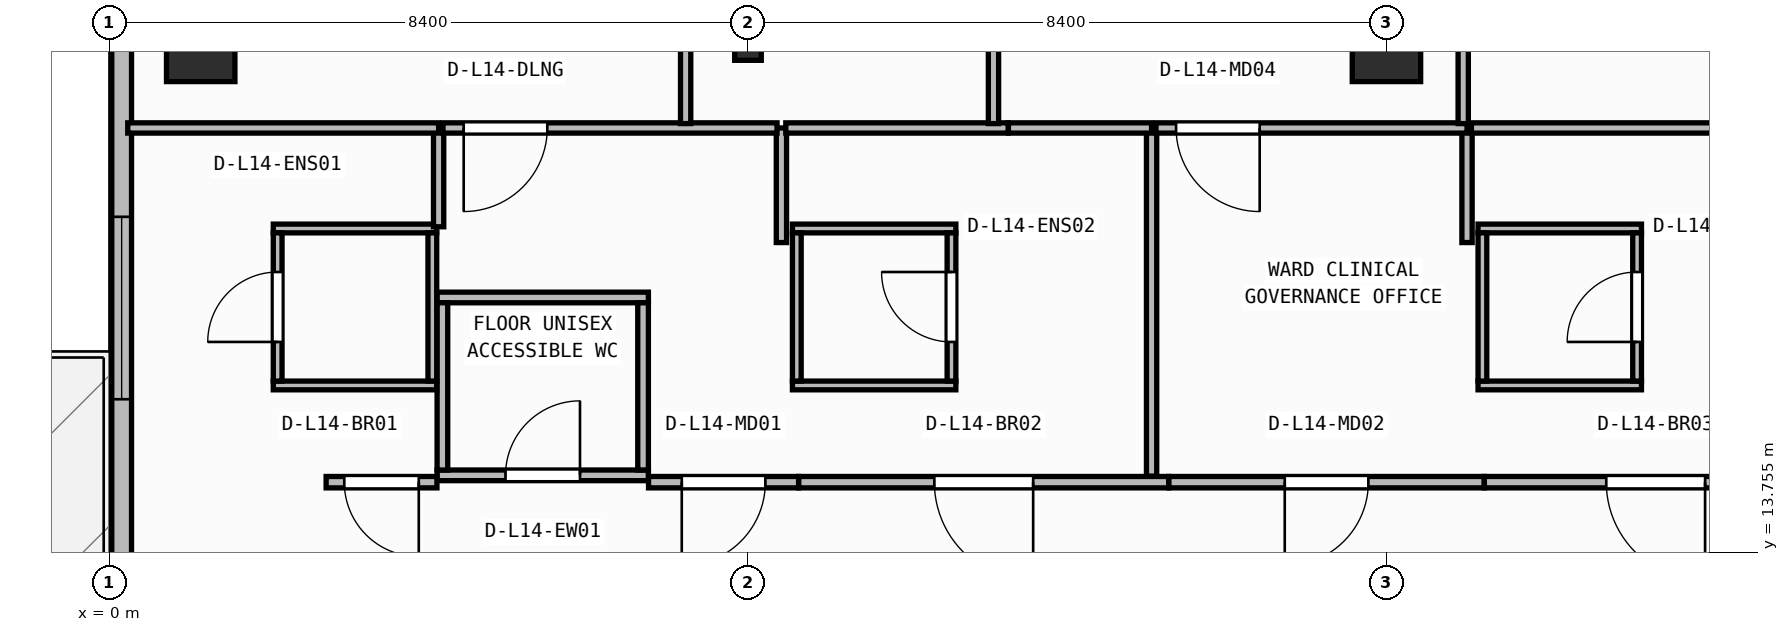
"""IFC4 building model, lengths in metres.
Left out: names, types, materials, properties, quantities, classifications, styles, units other than length and angle.
Written with IfcOpenShell. Run it as: python <this file> out.ifc"""

import sys

from ifc_helpers import new_model, si_unit, direction, frame, frame_2d, origin, origin_2d, place, context, subcontext, project, spatial, rectangle, i_section, extrude, element, fill, save


model = new_model("IFC4")
c1 = context("Model", 3, precision=1e-05, world=origin(), true_north=direction((0.0, 1.0)))
c2 = subcontext(c1, "Body", "Model", "MODEL_VIEW")
j1 = project(units=[si_unit("LENGTHUNIT", "METRE"), si_unit("PLANEANGLEUNIT", "RADIAN")], contexts=[c1])
p1 = place(None, origin())
s1 = spatial("IfcSite", under=j1, at=p1, CompositionType="ELEMENT")
p2 = place(p1, origin())
s2 = spatial("IfcBuilding", under=s1, at=p2, CompositionType="ELEMENT")
p3 = place(p2, frame((0.0, 0.0, 58.05)))
s3 = spatial("IfcBuildingStorey", under=s2, at=p3, CompositionType="ELEMENT", Elevation=58.05)
p4 = place(p3, frame((1.2, 20.4, 0.0), z_axis=(0.0, 0.0, 1.0), x_axis=(1.0, 0.0, 0.0)))
e1 = element("IfcColumn", 1, at=p4, inside=s3, PredefinedType="COLUMN", context=c2, shape_type="SweptSolid", body=[
    extrude(rectangle(XDim=0.9, YDim=0.9, at=origin_2d()), origin(), (0.0, 0.0, 1.0), 3.95),
])
p5 = place(p3, frame((8.4, 20.4, 0.0), z_axis=(0.0, 0.0, 1.0), x_axis=(1.0, 0.0, 0.0)))
e2 = element("IfcColumn", 2, at=p5, inside=s3, PredefinedType="COLUMN", context=c2, shape_type="SweptSolid", body=[
    extrude(i_section(OverallWidth=0.35, OverallDepth=0.34, WebThickness=0.016, FlangeThickness=0.028, at=origin_2d()), origin(), (0.0, 0.0, 1.0), 3.95),
])
p6 = place(p3, frame((16.8, 20.4, 0.0), z_axis=(0.0, 0.0, 1.0), x_axis=(1.0, 0.0, 0.0)))
e3 = element("IfcColumn", 3, at=p6, inside=s3, PredefinedType="COLUMN", context=c2, shape_type="SweptSolid", body=[
    extrude(rectangle(XDim=0.9, YDim=0.9, at=origin_2d()), origin(), (0.0, 0.0, 1.0), 3.95),
])
p7 = place(p3, frame((0.16, 41.04, 0.0), z_axis=(0.0, 0.0, 1.0), x_axis=(0.0, -1.0, 0.0)))
e4 = element("IfcWall", 4, at=p7, inside=s3, PredefinedType="STANDARD", context=c2, shape_type="SweptSolid", body=[
    extrude(rectangle(XDim=38.28, YDim=0.26, at=frame_2d((19.14, 0.0))), origin(), (0.0, 0.0, 1.0), 3.71),
])
p8 = place(p7, frame((30.187, 0.0, 0.0)))
e5 = element("IfcOpeningElement", 5, at=p8, cuts=e4, PredefinedType="OPENING", context=c2, shape_type="SweptSolid", body=[
    extrude(rectangle(XDim=1.3, YDim=2.15, at=frame_2d((0.65, 1.075))), frame((0.0, 0.14, 0.0), z_axis=(0.0, -1.0, 0.0), x_axis=(1.0, 0.0, 0.0)), (0.0, 0.0, 1.0), 0.28),
])
p9 = place(p7, frame((22.869, 0.0, 0.9)))
e6 = element("IfcOpeningElement", 6, at=p9, cuts=e4, PredefinedType="OPENING", context=c2, shape_type="SweptSolid", body=[
    extrude(rectangle(XDim=2.4, YDim=1.65, at=frame_2d((1.2, 0.825))), frame((0.0, 0.14, 0.0), z_axis=(0.0, -1.0, 0.0), x_axis=(1.0, 0.0, 0.0)), (0.0, 0.0, 1.0), 0.28),
])
p10 = place(p3, frame((4.31, 14.77, 0.0), z_axis=(0.0, 0.0, 1.0), x_axis=(1.0, 0.0, 0.0)))
e7 = element("IfcWall", 7, at=p10, inside=s3, PredefinedType="PARTITIONING", context=c2, shape_type="SweptSolid", body=[
    extrude(rectangle(XDim=2.78, YDim=0.14, at=frame_2d((1.39, 0.0))), origin(), (0.0, 0.0, 1.0), 3.71),
])
p11 = place(p10, frame((0.9, 0.0, 0.0)))
e8 = element("IfcOpeningElement", 8, at=p11, cuts=e7, PredefinedType="OPENING", context=c2, shape_type="SweptSolid", body=[
    extrude(rectangle(XDim=0.98, YDim=2.1, at=frame_2d((0.49, 1.05))), frame((0.0, 0.08, 0.0), z_axis=(0.0, -1.0, 0.0), x_axis=(1.0, 0.0, 0.0)), (0.0, 0.0, 1.0), 0.16),
])
p12 = place(p3, frame((4.31, 17.11, 0.0), z_axis=(0.0, 0.0, 1.0), x_axis=(1.0, 0.0, 0.0)))
e9 = element("IfcWall", 9, at=p12, inside=s3, PredefinedType="PARTITIONING", context=c2, shape_type="SweptSolid", body=[
    extrude(rectangle(XDim=2.78, YDim=0.14, at=frame_2d((1.39, 0.0))), origin(), (0.0, 0.0, 1.0), 3.71),
])
for number, where, z_axis, x_axis in (
    (10, (4.38, 14.84, 0.0), (0.0, 0.0, 1.0), (0.0, 1.0, 0.0)),
    (11, (7.02, 14.84, 0.0), (0.0, 0.0, 1.0), (0.0, 1.0, 0.0)),
):
    element("IfcWall", number, at=place(p3, frame(where, z_axis=z_axis, x_axis=x_axis)), inside=s3, PredefinedType="PARTITIONING", context=c2, shape_type="SweptSolid", body=[
        extrude(rectangle(XDim=2.2, YDim=0.14, at=frame_2d((1.1, 0.0))), origin(), (0.0, 0.0, 1.0), 3.71),
    ])
for number, where, z_axis, x_axis in (
    (12, (2.155, 15.952, 0.0), (0.0, 0.0, 1.0), (1.0, 0.0, 0.0)),
    (13, (2.155, 18.018, 0.0), (0.0, 0.0, 1.0), (1.0, 0.0, 0.0)),
):
    element("IfcWall", number, at=place(p3, frame(where, z_axis=z_axis, x_axis=x_axis)), inside=s3, PredefinedType="PARTITIONING", context=c2, shape_type="SweptSolid", body=[
        extrude(rectangle(XDim=2.15, YDim=0.115, at=frame_2d((1.075, 0.0))), origin(), (0.0, 0.0, 1.0), 3.71),
    ])
p13 = place(p3, frame((2.212, 16.01, 0.0), z_axis=(0.0, 0.0, 1.0), x_axis=(0.0, 1.0, 0.0)))
e14 = element("IfcWall", 14, at=p13, inside=s3, PredefinedType="PARTITIONING", context=c2, shape_type="SweptSolid", body=[
    extrude(rectangle(XDim=1.95, YDim=0.115, at=frame_2d((0.975, 0.0))), origin(), (0.0, 0.0, 1.0), 3.71),
])
p14 = place(p13, frame((0.515, 0.0, 0.0)))
e15 = element("IfcOpeningElement", 15, at=p14, cuts=e14, PredefinedType="OPENING", context=c2, shape_type="SweptSolid", body=[
    extrude(rectangle(XDim=0.92, YDim=2.1, at=frame_2d((0.46, 1.05))), frame((0.0, 0.067, 0.0), z_axis=(0.0, -1.0, 0.0), x_axis=(1.0, 0.0, 0.0)), (0.0, 0.0, 1.0), 0.135),
])
p15 = place(p3, frame((4.248, 16.01, 0.0), z_axis=(0.0, 0.0, 1.0), x_axis=(0.0, 1.0, 0.0)))
e16 = element("IfcWall", 16, at=p15, inside=s3, PredefinedType="PARTITIONING", context=c2, shape_type="SweptSolid", body=[
    extrude(rectangle(XDim=1.95, YDim=0.115, at=frame_2d((0.975, 0.0))), origin(), (0.0, 0.0, 1.0), 3.71),
])
for number, where, z_axis, x_axis in (
    (17, (8.985, 15.952, 0.0), (0.0, 0.0, 1.0), (1.0, 0.0, 0.0)),
    (18, (8.985, 18.018, 0.0), (0.0, 0.0, 1.0), (1.0, 0.0, 0.0)),
):
    element("IfcWall", number, at=place(p3, frame(where, z_axis=z_axis, x_axis=x_axis)), inside=s3, PredefinedType="PARTITIONING", context=c2, shape_type="SweptSolid", body=[
        extrude(rectangle(XDim=2.15, YDim=0.115, at=frame_2d((1.075, 0.0))), origin(), (0.0, 0.0, 1.0), 3.71),
    ])
p16 = place(p3, frame((9.042, 16.01, 0.0), z_axis=(0.0, 0.0, 1.0), x_axis=(0.0, 1.0, 0.0)))
e19 = element("IfcWall", 19, at=p16, inside=s3, PredefinedType="PARTITIONING", context=c2, shape_type="SweptSolid", body=[
    extrude(rectangle(XDim=1.95, YDim=0.115, at=frame_2d((0.975, 0.0))), origin(), (0.0, 0.0, 1.0), 3.71),
])
p17 = place(p3, frame((11.077, 16.01, 0.0), z_axis=(0.0, 0.0, 1.0), x_axis=(0.0, 1.0, 0.0)))
e20 = element("IfcWall", 20, at=p17, inside=s3, PredefinedType="PARTITIONING", context=c2, shape_type="SweptSolid", body=[
    extrude(rectangle(XDim=1.95, YDim=0.115, at=frame_2d((0.975, 0.0))), origin(), (0.0, 0.0, 1.0), 3.71),
])
p18 = place(p17, frame((0.515, 0.0, 0.0)))
e21 = element("IfcOpeningElement", 21, at=p18, cuts=e20, PredefinedType="OPENING", context=c2, shape_type="SweptSolid", body=[
    extrude(rectangle(XDim=0.92, YDim=2.1, at=frame_2d((0.46, 1.05))), frame((0.0, 0.067, 0.0), z_axis=(0.0, -1.0, 0.0), x_axis=(1.0, 0.0, 0.0)), (0.0, 0.0, 1.0), 0.135),
])
for number, where, z_axis, x_axis in (
    (22, (18.005, 15.952, 0.0), (0.0, 0.0, 1.0), (1.0, 0.0, 0.0)),
    (23, (18.005, 18.018, 0.0), (0.0, 0.0, 1.0), (1.0, 0.0, 0.0)),
):
    element("IfcWall", number, at=place(p3, frame(where, z_axis=z_axis, x_axis=x_axis)), inside=s3, PredefinedType="PARTITIONING", context=c2, shape_type="SweptSolid", body=[
        extrude(rectangle(XDim=2.15, YDim=0.115, at=frame_2d((1.075, 0.0))), origin(), (0.0, 0.0, 1.0), 3.71),
    ])
p19 = place(p3, frame((18.062, 16.01, 0.0), z_axis=(0.0, 0.0, 1.0), x_axis=(0.0, 1.0, 0.0)))
e24 = element("IfcWall", 24, at=p19, inside=s3, PredefinedType="PARTITIONING", context=c2, shape_type="SweptSolid", body=[
    extrude(rectangle(XDim=1.95, YDim=0.115, at=frame_2d((0.975, 0.0))), origin(), (0.0, 0.0, 1.0), 3.71),
])
p20 = place(p3, frame((20.097, 16.01, 0.0), z_axis=(0.0, 0.0, 1.0), x_axis=(0.0, 1.0, 0.0)))
e25 = element("IfcWall", 25, at=p20, inside=s3, PredefinedType="PARTITIONING", context=c2, shape_type="SweptSolid", body=[
    extrude(rectangle(XDim=1.95, YDim=0.115, at=frame_2d((0.975, 0.0))), origin(), (0.0, 0.0, 1.0), 3.71),
])
p21 = place(p20, frame((0.515, 0.0, 0.0)))
e26 = element("IfcOpeningElement", 26, at=p21, cuts=e25, PredefinedType="OPENING", context=c2, shape_type="SweptSolid", body=[
    extrude(rectangle(XDim=0.92, YDim=2.1, at=frame_2d((0.46, 1.05))), frame((0.0, 0.067, 0.0), z_axis=(0.0, -1.0, 0.0), x_axis=(1.0, 0.0, 0.0)), (0.0, 0.0, 1.0), 0.135),
])
p22 = place(p3, frame((4.308, 14.68, 0.0), z_axis=(0.0, 0.0, 1.0), x_axis=(-1.0, 0.0, 0.0)))
e27 = element("IfcWall", 27, at=p22, inside=s3, PredefinedType="PARTITIONING", context=c2, shape_type="SweptSolid", body=[
    extrude(rectangle(XDim=1.458, YDim=0.15, at=frame_2d((0.729, 0.0))), origin(), (0.0, 0.0, 1.0), 3.71),
])
p23 = place(p22, frame((0.239, 0.0, 0.0)))
e28 = element("IfcOpeningElement", 28, at=p23, cuts=e27, PredefinedType="OPENING", context=c2, shape_type="SweptSolid", body=[
    extrude(rectangle(XDim=0.98, YDim=2.1, at=frame_2d((0.49, 1.05))), frame((0.0, 0.085, 0.0), z_axis=(0.0, -1.0, 0.0), x_axis=(1.0, 0.0, 0.0)), (0.0, 0.0, 1.0), 0.17),
])
p24 = place(p3, frame((9.066, 14.68, 0.0), z_axis=(0.0, 0.0, 1.0), x_axis=(-1.0, 0.0, 0.0)))
e29 = element("IfcWall", 29, at=p24, inside=s3, PredefinedType="PARTITIONING", context=c2, shape_type="SweptSolid", body=[
    extrude(rectangle(XDim=1.974, YDim=0.15, at=frame_2d((0.987, 0.0))), origin(), (0.0, 0.0, 1.0), 3.71),
])
p25 = place(p24, frame((0.437, 0.0, 0.0)))
e30 = element("IfcOpeningElement", 30, at=p25, cuts=e29, PredefinedType="OPENING", context=c2, shape_type="SweptSolid", body=[
    extrude(rectangle(XDim=1.1, YDim=2.1, at=frame_2d((0.55, 1.05))), frame((0.0, 0.085, 0.0), z_axis=(0.0, -1.0, 0.0), x_axis=(1.0, 0.0, 0.0)), (0.0, 0.0, 1.0), 0.17),
])
p26 = place(p3, frame((13.936, 14.68, 0.0), z_axis=(0.0, 0.0, 1.0), x_axis=(-1.0, 0.0, 0.0)))
e31 = element("IfcWall", 31, at=p26, inside=s3, PredefinedType="PARTITIONING", context=c2, shape_type="SweptSolid", body=[
    extrude(rectangle(XDim=4.868, YDim=0.15, at=frame_2d((2.434, 0.0))), origin(), (0.0, 0.0, 1.0), 3.71),
])
p27 = place(p26, frame((1.784, 0.0, 0.0)))
e32 = element("IfcOpeningElement", 32, at=p27, cuts=e31, PredefinedType="OPENING", context=c2, shape_type="SweptSolid", body=[
    extrude(rectangle(XDim=1.3, YDim=2.15, at=frame_2d((0.65, 1.075))), frame((0.0, 0.085, 0.0), z_axis=(0.0, -1.0, 0.0), x_axis=(1.0, 0.0, 0.0)), (0.0, 0.0, 1.0), 0.17),
])
p28 = place(p3, frame((18.086, 14.68, 0.0), z_axis=(0.0, 0.0, 1.0), x_axis=(-1.0, 0.0, 0.0)))
e33 = element("IfcWall", 33, at=p28, inside=s3, PredefinedType="PARTITIONING", context=c2, shape_type="SweptSolid", body=[
    extrude(rectangle(XDim=4.148, YDim=0.15, at=frame_2d((2.074, 0.0))), origin(), (0.0, 0.0, 1.0), 3.71),
])
p29 = place(p28, frame((1.524, 0.0, 0.0)))
e34 = element("IfcOpeningElement", 34, at=p29, cuts=e33, PredefinedType="OPENING", context=c2, shape_type="SweptSolid", body=[
    extrude(rectangle(XDim=1.1, YDim=2.1, at=frame_2d((0.55, 1.05))), frame((0.0, 0.085, 0.0), z_axis=(0.0, -1.0, 0.0), x_axis=(1.0, 0.0, 0.0)), (0.0, 0.0, 1.0), 0.17),
])
p30 = place(p3, frame((22.596, 14.68, 0.0), z_axis=(0.0, 0.0, 1.0), x_axis=(-1.0, 0.0, 0.0)))
e35 = element("IfcWall", 35, at=p30, inside=s3, PredefinedType="PARTITIONING", context=c2, shape_type="SweptSolid", body=[
    extrude(rectangle(XDim=4.508, YDim=0.15, at=frame_2d((2.254, 0.0))), origin(), (0.0, 0.0, 1.0), 3.71),
])
p31 = place(p30, frame((1.604, 0.0, 0.0)))
e36 = element("IfcOpeningElement", 36, at=p31, cuts=e35, PredefinedType="OPENING", context=c2, shape_type="SweptSolid", body=[
    extrude(rectangle(XDim=1.3, YDim=2.15, at=frame_2d((0.65, 1.075))), frame((0.0, 0.085, 0.0), z_axis=(0.0, -1.0, 0.0), x_axis=(1.0, 0.0, 0.0)), (0.0, 0.0, 1.0), 0.17),
])
p32 = place(p3, frame((4.33, 18.04, 0.0), z_axis=(0.0, 0.0, 1.0), x_axis=(0.0, 1.0, 0.0)))
e37 = element("IfcWall", 37, at=p32, inside=s3, PredefinedType="PARTITIONING", context=c2, shape_type="SweptSolid", body=[
    extrude(rectangle(XDim=1.3, YDim=0.135, at=frame_2d((0.65, 0.0))), origin(), (0.0, 0.0, 1.0), 3.71),
])
p33 = place(p3, frame((4.33, 19.34, 0.0), z_axis=(0.0, 0.0, 1.0), x_axis=(-1.0, 0.0, 0.0)))
e38 = element("IfcWall", 38, at=p33, inside=s3, PredefinedType="PARTITIONING", context=c2, shape_type="SweptSolid", body=[
    extrude(rectangle(XDim=4.09, YDim=0.135, at=frame_2d((2.045, 0.0))), origin(), (0.0, 0.0, 1.0), 3.71),
])
p34 = place(p3, frame((8.84, 17.833, 0.0), z_axis=(0.0, 0.0, 1.0), x_axis=(0.0, 1.0, 0.0)))
e39 = element("IfcWall", 39, at=p34, inside=s3, PredefinedType="PARTITIONING", context=c2, shape_type="SweptSolid", body=[
    extrude(rectangle(XDim=1.508, YDim=0.135, at=frame_2d((0.754, 0.0))), origin(), (0.0, 0.0, 1.0), 3.71),
])
p35 = place(p3, frame((8.782, 19.34, 0.0), z_axis=(0.0, 0.0, 1.0), x_axis=(-1.0, 0.0, 0.0)))
e40 = element("IfcWall", 40, at=p35, inside=s3, PredefinedType="PARTITIONING", context=c2, shape_type="SweptSolid", body=[
    extrude(rectangle(XDim=4.395, YDim=0.135, at=frame_2d((2.198, 0.0))), origin(), (0.0, 0.0, 1.0), 3.71),
])
p36 = place(p35, frame((3.023, 0.0, 0.0)))
e41 = element("IfcOpeningElement", 41, at=p36, cuts=e40, PredefinedType="OPENING", context=c2, shape_type="SweptSolid", body=[
    extrude(rectangle(XDim=1.1, YDim=2.1, at=frame_2d((0.55, 1.05))), frame((0.0, 0.077, 0.0), z_axis=(0.0, -1.0, 0.0), x_axis=(1.0, 0.0, 0.0)), (0.0, 0.0, 1.0), 0.155),
])
p37 = place(p3, frame((13.71, 14.76, 0.0), z_axis=(0.0, 0.0, 1.0), x_axis=(0.0, 1.0, 0.0)))
e42 = element("IfcWall", 42, at=p37, inside=s3, PredefinedType="PARTITIONING", context=c2, shape_type="SweptSolid", body=[
    extrude(rectangle(XDim=4.58, YDim=0.135, at=frame_2d((2.29, 0.0))), origin(), (0.0, 0.0, 1.0), 3.71),
])
p38 = place(p3, frame((11.825, 19.34, 0.0), z_axis=(0.0, 0.0, 1.0), x_axis=(-1.0, 0.0, 0.0)))
e43 = element("IfcWall", 43, at=p38, inside=s3, PredefinedType="PARTITIONING", context=c2, shape_type="SweptSolid", body=[
    extrude(rectangle(XDim=2.927, YDim=0.135, at=frame_2d((1.464, 0.0))), origin(), (0.0, 0.0, 1.0), 3.71),
])
p39 = place(p3, frame((13.71, 19.34, 0.0), z_axis=(0.0, 0.0, 1.0), x_axis=(-1.0, 0.0, 0.0)))
e44 = element("IfcWall", 44, at=p39, inside=s3, PredefinedType="PARTITIONING", context=c2, shape_type="SweptSolid", body=[
    extrude(rectangle(XDim=1.883, YDim=0.135, at=frame_2d((0.942, 0.0))), origin(), (0.0, 0.0, 1.0), 3.71),
])
p40 = place(p3, frame((17.86, 17.833, 0.0), z_axis=(0.0, 0.0, 1.0), x_axis=(0.0, 1.0, 0.0)))
e45 = element("IfcWall", 45, at=p40, inside=s3, PredefinedType="PARTITIONING", context=c2, shape_type="SweptSolid", body=[
    extrude(rectangle(XDim=1.508, YDim=0.135, at=frame_2d((0.754, 0.0))), origin(), (0.0, 0.0, 1.0), 3.71),
])
p41 = place(p3, frame((17.86, 19.34, 0.0), z_axis=(0.0, 0.0, 1.0), x_axis=(-1.0, 0.0, 0.0)))
e46 = element("IfcWall", 46, at=p41, inside=s3, PredefinedType="PARTITIONING", context=c2, shape_type="SweptSolid", body=[
    extrude(rectangle(XDim=4.093, YDim=0.135, at=frame_2d((2.046, 0.0))), origin(), (0.0, 0.0, 1.0), 3.71),
])
p42 = place(p41, frame((2.728, 0.0, 0.0)))
e47 = element("IfcOpeningElement", 47, at=p42, cuts=e46, PredefinedType="OPENING", context=c2, shape_type="SweptSolid", body=[
    extrude(rectangle(XDim=1.1, YDim=2.1, at=frame_2d((0.55, 1.05))), frame((0.0, 0.077, 0.0), z_axis=(0.0, -1.0, 0.0), x_axis=(1.0, 0.0, 0.0)), (0.0, 0.0, 1.0), 0.155),
])
p43 = place(p3, frame((22.37, 19.34, 0.0), z_axis=(0.0, 0.0, 1.0), x_axis=(-1.0, 0.0, 0.0)))
e48 = element("IfcWall", 48, at=p43, inside=s3, PredefinedType="PARTITIONING", context=c2, shape_type="SweptSolid", body=[
    extrude(rectangle(XDim=4.453, YDim=0.135, at=frame_2d((2.226, 0.0))), origin(), (0.0, 0.0, 1.0), 3.71),
])
p44 = place(p3, frame((7.58, 19.397, 0.0), z_axis=(0.0, 0.0, 1.0), x_axis=(0.0, 1.0, 0.0)))
e49 = element("IfcWall", 49, at=p44, inside=s3, PredefinedType="PARTITIONING", context=c2, shape_type="SweptSolid", body=[
    extrude(rectangle(XDim=9.522, YDim=0.135, at=frame_2d((4.761, 0.0))), origin(), (0.0, 0.0, 1.0), 3.71),
])
p45 = place(p44, frame((4.612, 0.0, 0.0)))
e50 = element("IfcOpeningElement", 50, at=p45, cuts=e49, PredefinedType="OPENING", context=c2, shape_type="SweptSolid", body=[
    extrude(rectangle(XDim=1.1, YDim=2.1, at=frame_2d((0.55, 1.05))), frame((0.0, 0.077, 0.0), z_axis=(0.0, -1.0, 0.0), x_axis=(1.0, 0.0, 0.0)), (0.0, 0.0, 1.0), 0.155),
])
for number, where, z_axis, x_axis in (
    (51, (11.63, 19.397, 0.0), (0.0, 0.0, 1.0), (0.0, 1.0, 0.0)),
    (52, (17.81, 19.397, 0.0), (0.0, 0.0, 1.0), (0.0, 1.0, 0.0)),
):
    element("IfcWall", number, at=place(p3, frame(where, z_axis=z_axis, x_axis=x_axis)), inside=s3, PredefinedType="PARTITIONING", context=c2, shape_type="SweptSolid", body=[
        extrude(rectangle(XDim=9.522, YDim=0.135, at=frame_2d((4.761, 0.0))), origin(), (0.0, 0.0, 1.0), 3.71),
    ])
p46 = place(p11, origin())
e53 = element("IfcDoor", 53, at=p46, inside=s3, OperationType="SINGLE_SWING_RIGHT", PredefinedType="DOOR", context=c2, shape_type="SweptSolid", body=[
    extrude(rectangle(XDim=0.98, YDim=2.1, at=frame_2d((0.49, 1.05))), frame((0.0, 0.025, 0.0), z_axis=(0.0, -1.0, 0.0), x_axis=(1.0, 0.0, 0.0)), (0.0, 0.0, 1.0), 0.05),
])
fill(e8, e53)
p47 = place(p14, origin())
e54 = element("IfcDoor", 54, at=p47, inside=s3, OperationType="SINGLE_SWING_LEFT", PredefinedType="DOOR", context=c2, shape_type="SweptSolid", body=[
    extrude(rectangle(XDim=0.92, YDim=2.1, at=frame_2d((0.46, 1.05))), frame((0.0, 0.025, 0.0), z_axis=(0.0, -1.0, 0.0), x_axis=(1.0, 0.0, 0.0)), (0.0, 0.0, 1.0), 0.05),
])
fill(e15, e54)
p48 = place(p18, origin())
e55 = element("IfcDoor", 55, at=p48, inside=s3, OperationType="SINGLE_SWING_RIGHT", PredefinedType="DOOR", context=c2, shape_type="SweptSolid", body=[
    extrude(rectangle(XDim=0.92, YDim=2.1, at=frame_2d((0.46, 1.05))), frame((0.0, 0.025, 0.0), z_axis=(0.0, -1.0, 0.0), x_axis=(1.0, 0.0, 0.0)), (0.0, 0.0, 1.0), 0.05),
])
fill(e21, e55)
p49 = place(p21, origin())
e56 = element("IfcDoor", 56, at=p49, inside=s3, OperationType="SINGLE_SWING_LEFT", PredefinedType="DOOR", context=c2, shape_type="SweptSolid", body=[
    extrude(rectangle(XDim=0.92, YDim=2.1, at=frame_2d((0.46, 1.05))), frame((0.0, 0.025, 0.0), z_axis=(0.0, -1.0, 0.0), x_axis=(1.0, 0.0, 0.0)), (0.0, 0.0, 1.0), 0.05),
])
fill(e26, e56)
p50 = place(p23, origin())
e57 = element("IfcDoor", 57, at=p50, inside=s3, OperationType="SINGLE_SWING_LEFT", PredefinedType="DOOR", context=c2, shape_type="SweptSolid", body=[
    extrude(rectangle(XDim=0.98, YDim=2.1, at=frame_2d((0.49, 1.05))), frame((0.0, 0.025, 0.0), z_axis=(0.0, -1.0, 0.0), x_axis=(1.0, 0.0, 0.0)), (0.0, 0.0, 1.0), 0.05),
])
fill(e28, e57)
p51 = place(p25, origin())
e58 = element("IfcDoor", 58, at=p51, inside=s3, OperationType="SINGLE_SWING_RIGHT", PredefinedType="DOOR", context=c2, shape_type="SweptSolid", body=[
    extrude(rectangle(XDim=1.1, YDim=2.1, at=frame_2d((0.55, 1.05))), frame((0.0, 0.025, 0.0), z_axis=(0.0, -1.0, 0.0), x_axis=(1.0, 0.0, 0.0)), (0.0, 0.0, 1.0), 0.05),
])
fill(e30, e58)
p52 = place(p27, origin())
e59 = element("IfcDoor", 59, at=p52, inside=s3, OperationType="SINGLE_SWING_LEFT", PredefinedType="DOOR", context=c2, shape_type="SweptSolid", body=[
    extrude(rectangle(XDim=1.3, YDim=2.15, at=frame_2d((0.65, 1.075))), frame((0.0, 0.025, 0.0), z_axis=(0.0, -1.0, 0.0), x_axis=(1.0, 0.0, 0.0)), (0.0, 0.0, 1.0), 0.05),
])
fill(e32, e59)
p53 = place(p29, origin())
e60 = element("IfcDoor", 60, at=p53, inside=s3, OperationType="SINGLE_SWING_RIGHT", PredefinedType="DOOR", context=c2, shape_type="SweptSolid", body=[
    extrude(rectangle(XDim=1.1, YDim=2.1, at=frame_2d((0.55, 1.05))), frame((0.0, 0.025, 0.0), z_axis=(0.0, -1.0, 0.0), x_axis=(1.0, 0.0, 0.0)), (0.0, 0.0, 1.0), 0.05),
])
fill(e34, e60)
p54 = place(p31, origin())
e61 = element("IfcDoor", 61, at=p54, inside=s3, OperationType="SINGLE_SWING_LEFT", PredefinedType="DOOR", context=c2, shape_type="SweptSolid", body=[
    extrude(rectangle(XDim=1.3, YDim=2.15, at=frame_2d((0.65, 1.075))), frame((0.0, 0.025, 0.0), z_axis=(0.0, -1.0, 0.0), x_axis=(1.0, 0.0, 0.0)), (0.0, 0.0, 1.0), 0.05),
])
fill(e36, e61)
p55 = place(p36, origin())
e62 = element("IfcDoor", 62, at=p55, inside=s3, OperationType="SINGLE_SWING_RIGHT", PredefinedType="DOOR", context=c2, shape_type="SweptSolid", body=[
    extrude(rectangle(XDim=1.1, YDim=2.1, at=frame_2d((0.55, 1.05))), frame((0.0, 0.025, 0.0), z_axis=(0.0, -1.0, 0.0), x_axis=(1.0, 0.0, 0.0)), (0.0, 0.0, 1.0), 0.05),
])
fill(e41, e62)
p56 = place(p42, origin())
e63 = element("IfcDoor", 63, at=p56, inside=s3, OperationType="SINGLE_SWING_LEFT", PredefinedType="DOOR", context=c2, shape_type="SweptSolid", body=[
    extrude(rectangle(XDim=1.1, YDim=2.1, at=frame_2d((0.55, 1.05))), frame((0.0, 0.025, 0.0), z_axis=(0.0, -1.0, 0.0), x_axis=(1.0, 0.0, 0.0)), (0.0, 0.0, 1.0), 0.05),
])
fill(e47, e63)
p57 = place(p9, origin())
e64 = element("IfcWindow", 64, at=p57, inside=s3, PartitioningType="SINGLE_PANEL", PredefinedType="WINDOW", context=c2, shape_type="SweptSolid", body=[
    extrude(rectangle(XDim=2.4, YDim=1.65, at=frame_2d((1.2, 0.825))), frame((0.0, 0.03, 0.0), z_axis=(0.0, -1.0, 0.0), x_axis=(1.0, 0.0, 0.0)), (0.0, 0.0, 1.0), 0.06),
])
fill(e6, e64)
save(model, sys.argv[1])
